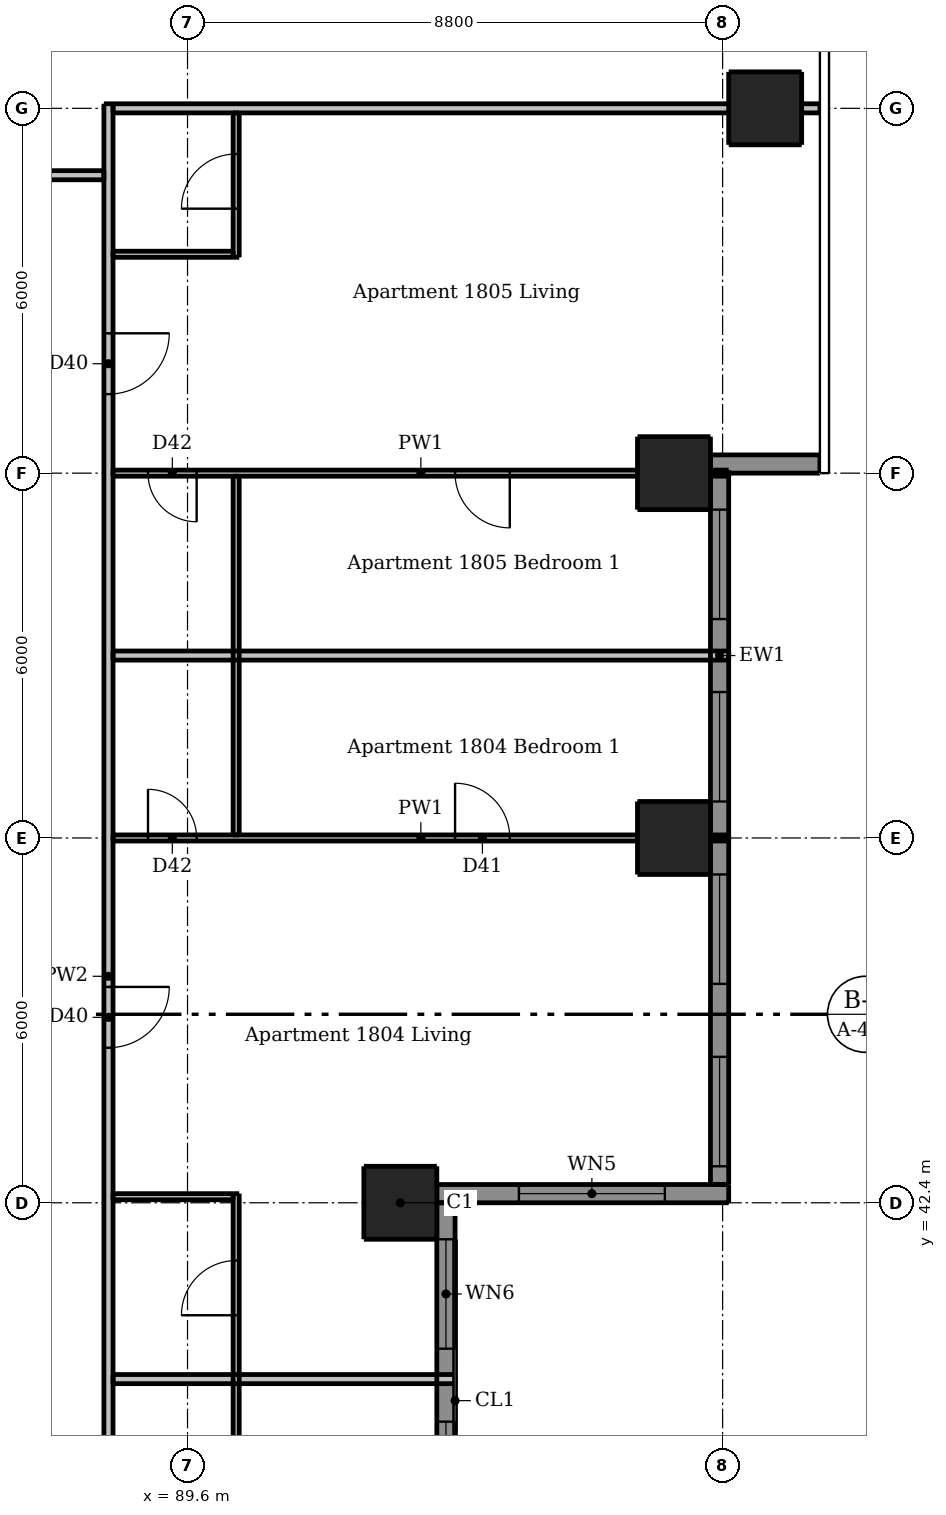
"""IFC4 building model, lengths in metres.
Left out: names, types, materials, properties, quantities, classifications, styles, units other than length and angle.
Written with IfcOpenShell. Run it as: python <this file> out.ifc"""

import sys

from ifc_helpers import new_model, si_unit, direction, frame, frame_2d, origin, origin_2d, place, context, subcontext, project, spatial, rectangle, extrude, element, fill, save


model = new_model("IFC4")
c1 = context("Model", 3, precision=1e-05, world=origin(), true_north=direction((0.0, 1.0)))
c2 = subcontext(c1, "Body", "Model", "MODEL_VIEW")
j1 = project(units=[si_unit("LENGTHUNIT", "METRE"), si_unit("PLANEANGLEUNIT", "RADIAN")], contexts=[c1])
p1 = place(None, origin())
s1 = spatial("IfcSite", under=j1, at=p1, CompositionType="ELEMENT")
p2 = place(p1, origin())
s2 = spatial("IfcBuilding", under=s1, at=p2, CompositionType="ELEMENT")
p3 = place(p2, frame((0.0, 0.0, 66.4)))
s3 = spatial("IfcBuildingStorey", under=s2, at=p3, CompositionType="ELEMENT", Elevation=66.4)
for number, where, z_axis, x_axis in (
    (1, (93.1, 42.4, 0.0), (0.0, 0.0, 1.0), (1.0, 0.0, 0.0)),
    (2, (97.6, 48.4, 0.0), (0.0, 0.0, 1.0), (1.0, 0.0, 0.0)),
    (3, (97.6, 54.4, 0.0), (0.0, 0.0, 1.0), (1.0, 0.0, 0.0)),
    (4, (99.1, 60.4, 0.0), (0.0, 0.0, 1.0), (1.0, 0.0, 0.0)),
):
    element("IfcColumn", number, at=place(p3, frame(where, z_axis=z_axis, x_axis=x_axis)), inside=s3, PredefinedType="COLUMN", context=c2, shape_type="SweptSolid", body=[
        extrude(rectangle(XDim=1.2, YDim=1.2, at=origin_2d()), origin(), (0.0, 0.0, 1.0), 2.95),
    ])
p4 = place(p3, frame((93.7, 42.55, 0.0), z_axis=(0.0, 0.0, 1.0), x_axis=(1.0, 0.0, 0.0)))
e5 = element("IfcWall", 5, at=p4, inside=s3, PredefinedType="SOLIDWALL", context=c2, shape_type="SweptSolid", body=[
    extrude(rectangle(XDim=4.8, YDim=0.3, at=frame_2d((2.4, 0.0))), origin(), (0.0, 0.0, 1.0), 2.95),
])
p5 = place(p4, frame((1.35, 0.0, 0.15)))
e6 = element("IfcOpeningElement", 6, at=p5, cuts=e5, PredefinedType="OPENING", context=c2, shape_type="SweptSolid", body=[
    extrude(rectangle(XDim=2.4, YDim=2.1, at=frame_2d((1.2, 1.05))), frame((0.0, 0.16, 0.0), z_axis=(0.0, -1.0, 0.0), x_axis=(1.0, 0.0, 0.0)), (0.0, 0.0, 1.0), 0.32),
])
p6 = place(p3, frame((98.2, 54.55, 0.0), z_axis=(0.0, 0.0, 1.0), x_axis=(1.0, 0.0, 0.0)))
e7 = element("IfcWall", 7, at=p6, inside=s3, PredefinedType="SOLIDWALL", context=c2, shape_type="SweptSolid", body=[
    extrude(rectangle(XDim=1.8, YDim=0.3, at=frame_2d((0.9, 0.0))), origin(), (0.0, 0.0, 1.0), 2.95),
])
p7 = place(p3, frame((93.85, 36.49, 0.0), z_axis=(0.0, 0.0, 1.0), x_axis=(0.0, 1.0, 0.0)))
e8 = element("IfcWall", 8, at=p7, inside=s3, PredefinedType="SOLIDWALL", context=c2, shape_type="SweptSolid", body=[
    extrude(rectangle(XDim=5.91, YDim=0.3, at=frame_2d((2.955, 0.0))), origin(), (0.0, 0.0, 1.0), 2.95),
])
p8 = place(p7, frame((0.51, 0.0, 0.15)))
e9 = element("IfcOpeningElement", 9, at=p8, cuts=e8, PredefinedType="OPENING", context=c2, shape_type="SweptSolid", body=[
    extrude(rectangle(XDim=1.8, YDim=2.1, at=frame_2d((0.9, 1.05))), frame((0.0, 0.16, 0.0), z_axis=(0.0, -1.0, 0.0), x_axis=(1.0, 0.0, 0.0)), (0.0, 0.0, 1.0), 0.32),
])
p9 = place(p7, frame((3.51, 0.0, 0.15)))
e10 = element("IfcOpeningElement", 10, at=p9, cuts=e8, PredefinedType="OPENING", context=c2, shape_type="SweptSolid", body=[
    extrude(rectangle(XDim=1.8, YDim=2.1, at=frame_2d((0.9, 1.05))), frame((0.0, 0.16, 0.0), z_axis=(0.0, -1.0, 0.0), x_axis=(1.0, 0.0, 0.0)), (0.0, 0.0, 1.0), 0.32),
])
p10 = place(p3, frame((98.35, 42.7, 0.0), z_axis=(0.0, 0.0, 1.0), x_axis=(0.0, 1.0, 0.0)))
e11 = element("IfcWall", 11, at=p10, inside=s3, PredefinedType="SOLIDWALL", context=c2, shape_type="SweptSolid", body=[
    extrude(rectangle(XDim=5.7, YDim=0.3, at=frame_2d((2.85, 0.0))), origin(), (0.0, 0.0, 1.0), 2.341),
])
p11 = place(p10, frame((0.3, 0.0, 0.15)))
e12 = element("IfcOpeningElement", 12, at=p11, cuts=e11, PredefinedType="OPENING", context=c2, shape_type="SweptSolid", body=[
    extrude(rectangle(XDim=1.8, YDim=2.1, at=frame_2d((0.9, 1.05))), frame((0.0, 0.16, 0.0), z_axis=(0.0, -1.0, 0.0), x_axis=(1.0, 0.0, 0.0)), (0.0, 0.0, 1.0), 0.32),
])
p12 = place(p10, frame((3.3, 0.0, 0.15)))
e13 = element("IfcOpeningElement", 13, at=p12, cuts=e11, PredefinedType="OPENING", context=c2, shape_type="SweptSolid", body=[
    extrude(rectangle(XDim=1.8, YDim=2.1, at=frame_2d((0.9, 1.05))), frame((0.0, 0.16, 0.0), z_axis=(0.0, -1.0, 0.0), x_axis=(1.0, 0.0, 0.0)), (0.0, 0.0, 1.0), 0.32),
])
p13 = place(p3, frame((98.35, 48.4, 0.0), z_axis=(0.0, 0.0, 1.0), x_axis=(0.0, 1.0, 0.0)))
e14 = element("IfcWall", 14, at=p13, inside=s3, PredefinedType="SOLIDWALL", context=c2, shape_type="SweptSolid", body=[
    extrude(rectangle(XDim=6.0, YDim=0.3, at=frame_2d((3.0, 0.0))), origin(), (0.0, 0.0, 1.0), 2.341),
])
p14 = place(p13, frame((0.6, 0.0, 0.15)))
e15 = element("IfcOpeningElement", 15, at=p14, cuts=e14, PredefinedType="OPENING", context=c2, shape_type="SweptSolid", body=[
    extrude(rectangle(XDim=1.8, YDim=2.1, at=frame_2d((0.9, 1.05))), frame((0.0, 0.16, 0.0), z_axis=(0.0, -1.0, 0.0), x_axis=(1.0, 0.0, 0.0)), (0.0, 0.0, 1.0), 0.32),
])
p15 = place(p13, frame((3.6, 0.0, 0.15)))
e16 = element("IfcOpeningElement", 16, at=p15, cuts=e14, PredefinedType="OPENING", context=c2, shape_type="SweptSolid", body=[
    extrude(rectangle(XDim=1.8, YDim=2.1, at=frame_2d((0.9, 1.05))), frame((0.0, 0.16, 0.0), z_axis=(0.0, -1.0, 0.0), x_axis=(1.0, 0.0, 0.0)), (0.0, 0.0, 1.0), 0.32),
])
p16 = place(p3, frame((90.4, 33.45, 0.0), z_axis=(0.0, 0.0, 1.0), x_axis=(0.0, 1.0, 0.0)))
e17 = element("IfcWall", 17, at=p16, inside=s3, PredefinedType="PARTITIONING", context=c2, shape_type="SweptSolid", body=[
    extrude(rectangle(XDim=9.1, YDim=0.1, at=frame_2d((4.55, 0.0))), origin(), (0.0, 0.0, 1.0), 2.95),
])
p17 = place(p16, frame((3.8, 0.0, 0.0)))
e18 = element("IfcOpeningElement", 18, at=p17, cuts=e17, PredefinedType="OPENING", context=c2, shape_type="SweptSolid", body=[
    extrude(rectangle(XDim=0.8, YDim=2.1, at=frame_2d((0.4, 1.05))), frame((0.0, 0.06, 0.0), z_axis=(0.0, -1.0, 0.0), x_axis=(1.0, 0.0, 0.0)), (0.0, 0.0, 1.0), 0.12),
])
p18 = place(p16, frame((7.1, 0.0, 0.0)))
e19 = element("IfcOpeningElement", 19, at=p18, cuts=e17, PredefinedType="OPENING", context=c2, shape_type="SweptSolid", body=[
    extrude(rectangle(XDim=0.9, YDim=2.1, at=frame_2d((0.45, 1.05))), frame((0.0, 0.06, 0.0), z_axis=(0.0, -1.0, 0.0), x_axis=(1.0, 0.0, 0.0)), (0.0, 0.0, 1.0), 0.12),
])
p19 = place(p3, frame((90.4, 48.45, 0.0), z_axis=(0.0, 0.0, 1.0), x_axis=(0.0, 1.0, 0.0)))
e20 = element("IfcWall", 20, at=p19, inside=s3, PredefinedType="PARTITIONING", context=c2, shape_type="SweptSolid", body=[
    extrude(rectangle(XDim=5.9, YDim=0.1, at=frame_2d((2.95, 0.0))), origin(), (0.0, 0.0, 1.0), 2.95),
])
p20 = place(p3, frame((90.4, 57.95, 0.0), z_axis=(0.0, 0.0, 1.0), x_axis=(0.0, 1.0, 0.0)))
e21 = element("IfcWall", 21, at=p20, inside=s3, PredefinedType="PARTITIONING", context=c2, shape_type="SweptSolid", body=[
    extrude(rectangle(XDim=2.375, YDim=0.1, at=frame_2d((1.188, 0.0))), origin(), (0.0, 0.0, 1.0), 2.95),
])
p21 = place(p20, frame((0.8, 0.0, 0.0)))
e22 = element("IfcOpeningElement", 22, at=p21, cuts=e21, PredefinedType="OPENING", context=c2, shape_type="SweptSolid", body=[
    extrude(rectangle(XDim=0.9, YDim=2.1, at=frame_2d((0.45, 1.05))), frame((0.0, 0.06, 0.0), z_axis=(0.0, -1.0, 0.0), x_axis=(1.0, 0.0, 0.0)), (0.0, 0.0, 1.0), 0.12),
])
p22 = place(p3, frame((88.375, 58.0, 0.0), z_axis=(0.0, 0.0, 1.0), x_axis=(1.0, 0.0, 0.0)))
e23 = element("IfcWall", 23, at=p22, inside=s3, PredefinedType="PARTITIONING", context=c2, shape_type="SweptSolid", body=[
    extrude(rectangle(XDim=1.975, YDim=0.1, at=frame_2d((0.988, 0.0))), origin(), (0.0, 0.0, 1.0), 2.95),
])
p23 = place(p3, frame((98.5, 54.4, 0.0), z_axis=(0.0, 0.0, 1.0), x_axis=(-1.0, 0.0, 0.0)))
e24 = element("IfcWall", 24, at=p23, inside=s3, PredefinedType="PARTITIONING", context=c2, shape_type="SweptSolid", body=[
    extrude(rectangle(XDim=10.125, YDim=0.1, at=frame_2d((5.062, 0.0))), origin(), (0.0, 0.0, 1.0), 2.332),
])
p24 = place(p23, frame((3.6, 0.0, 0.0)))
e25 = element("IfcOpeningElement", 25, at=p24, cuts=e24, PredefinedType="OPENING", context=c2, shape_type="SweptSolid", body=[
    extrude(rectangle(XDim=0.9, YDim=2.1, at=frame_2d((0.45, 1.05))), frame((0.0, 0.06, 0.0), z_axis=(0.0, -1.0, 0.0), x_axis=(1.0, 0.0, 0.0)), (0.0, 0.0, 1.0), 0.12),
])
p25 = place(p23, frame((8.75, 0.0, 0.0)))
e26 = element("IfcOpeningElement", 26, at=p25, cuts=e24, PredefinedType="OPENING", context=c2, shape_type="SweptSolid", body=[
    extrude(rectangle(XDim=0.8, YDim=2.1, at=frame_2d((0.4, 1.05))), frame((0.0, 0.06, 0.0), z_axis=(0.0, -1.0, 0.0), x_axis=(1.0, 0.0, 0.0)), (0.0, 0.0, 1.0), 0.12),
])
p26 = place(p3, frame((88.375, 48.4, 0.0), z_axis=(0.0, 0.0, 1.0), x_axis=(1.0, 0.0, 0.0)))
e27 = element("IfcWall", 27, at=p26, inside=s3, PredefinedType="PARTITIONING", context=c2, shape_type="SweptSolid", body=[
    extrude(rectangle(XDim=10.125, YDim=0.1, at=frame_2d((5.062, 0.0))), origin(), (0.0, 0.0, 1.0), 2.332),
])
p27 = place(p26, frame((5.625, 0.0, 0.0)))
e28 = element("IfcOpeningElement", 28, at=p27, cuts=e27, PredefinedType="OPENING", context=c2, shape_type="SweptSolid", body=[
    extrude(rectangle(XDim=0.9, YDim=2.1, at=frame_2d((0.45, 1.05))), frame((0.0, 0.06, 0.0), z_axis=(0.0, -1.0, 0.0), x_axis=(1.0, 0.0, 0.0)), (0.0, 0.0, 1.0), 0.12),
])
p28 = place(p26, frame((0.575, 0.0, 0.0)))
e29 = element("IfcOpeningElement", 29, at=p28, cuts=e27, PredefinedType="OPENING", context=c2, shape_type="SweptSolid", body=[
    extrude(rectangle(XDim=0.8, YDim=2.1, at=frame_2d((0.4, 1.05))), frame((0.0, 0.06, 0.0), z_axis=(0.0, -1.0, 0.0), x_axis=(1.0, 0.0, 0.0)), (0.0, 0.0, 1.0), 0.12),
])
p29 = place(p3, frame((88.375, 42.5, 0.0), z_axis=(0.0, 0.0, 1.0), x_axis=(1.0, 0.0, 0.0)))
e30 = element("IfcWall", 30, at=p29, inside=s3, PredefinedType="PARTITIONING", context=c2, shape_type="SweptSolid", body=[
    extrude(rectangle(XDim=1.975, YDim=0.1, at=frame_2d((0.988, 0.0))), origin(), (0.0, 0.0, 1.0), 2.332),
])
p30 = place(p3, frame((88.3, 60.475, 0.0), z_axis=(0.0, 0.0, 1.0), x_axis=(0.0, -1.0, 0.0)))
e31 = element("IfcWall", 31, at=p30, inside=s3, PredefinedType="PARTITIONING", context=c2, shape_type="SweptSolid", body=[
    extrude(rectangle(XDim=28.7, YDim=0.15, at=frame_2d((14.35, 0.0))), origin(), (0.0, 0.0, 1.0), 2.95),
])
p31 = place(p30, frame((27.425, 0.0, 0.0)))
e32 = element("IfcOpeningElement", 32, at=p31, cuts=e31, PredefinedType="OPENING", context=c2, shape_type="SweptSolid", body=[
    extrude(rectangle(XDim=1.0, YDim=2.1, at=frame_2d((0.5, 1.05))), frame((0.0, 0.085, 0.0), z_axis=(0.0, -1.0, 0.0), x_axis=(1.0, 0.0, 0.0)), (0.0, 0.0, 1.0), 0.17),
])
p32 = place(p30, frame((14.525, 0.0, 0.0)))
e33 = element("IfcOpeningElement", 33, at=p32, cuts=e31, PredefinedType="OPENING", context=c2, shape_type="SweptSolid", body=[
    extrude(rectangle(XDim=1.0, YDim=2.1, at=frame_2d((0.5, 1.05))), frame((0.0, 0.085, 0.0), z_axis=(0.0, -1.0, 0.0), x_axis=(1.0, 0.0, 0.0)), (0.0, 0.0, 1.0), 0.17),
])
p33 = place(p30, frame((3.775, 0.0, 0.0)))
e34 = element("IfcOpeningElement", 34, at=p33, cuts=e31, PredefinedType="OPENING", context=c2, shape_type="SweptSolid", body=[
    extrude(rectangle(XDim=1.0, YDim=2.1, at=frame_2d((0.5, 1.05))), frame((0.0, 0.085, 0.0), z_axis=(0.0, -1.0, 0.0), x_axis=(1.0, 0.0, 0.0)), (0.0, 0.0, 1.0), 0.17),
])
p34 = place(p3, frame((88.375, 60.4, 0.0), z_axis=(0.0, 0.0, 1.0), x_axis=(1.0, 0.0, 0.0)))
e35 = element("IfcWall", 35, at=p34, inside=s3, PredefinedType="PARTITIONING", context=c2, shape_type="SweptSolid", body=[
    extrude(rectangle(XDim=11.625, YDim=0.15, at=frame_2d((5.812, 0.0))), origin(), (0.0, 0.0, 1.0), 2.332),
])
p35 = place(p3, frame((59.675, 59.3, 0.0), z_axis=(0.0, 0.0, 1.0), x_axis=(1.0, 0.0, 0.0)))
e36 = element("IfcWall", 36, at=p35, inside=s3, PredefinedType="PARTITIONING", context=c2, shape_type="SweptSolid", body=[
    extrude(rectangle(XDim=28.55, YDim=0.15, at=frame_2d((14.275, 0.0))), origin(), (0.0, 0.0, 1.0), 2.95),
])
p36 = place(p35, frame((3.625, 0.0, 0.0)))
e37 = element("IfcOpeningElement", 37, at=p36, cuts=e36, PredefinedType="OPENING", context=c2, shape_type="SweptSolid", body=[
    extrude(rectangle(XDim=1.0, YDim=2.1, at=frame_2d((0.5, 1.05))), frame((0.0, 0.085, 0.0), z_axis=(0.0, -1.0, 0.0), x_axis=(1.0, 0.0, 0.0)), (0.0, 0.0, 1.0), 0.17),
])
p37 = place(p35, frame((14.425, 0.0, 0.0)))
e38 = element("IfcOpeningElement", 38, at=p37, cuts=e36, PredefinedType="OPENING", context=c2, shape_type="SweptSolid", body=[
    extrude(rectangle(XDim=1.0, YDim=2.1, at=frame_2d((0.5, 1.05))), frame((0.0, 0.085, 0.0), z_axis=(0.0, -1.0, 0.0), x_axis=(1.0, 0.0, 0.0)), (0.0, 0.0, 1.0), 0.17),
])
p38 = place(p35, frame((25.775, 0.0, 0.0)))
e39 = element("IfcOpeningElement", 39, at=p38, cuts=e36, PredefinedType="OPENING", context=c2, shape_type="SweptSolid", body=[
    extrude(rectangle(XDim=1.0, YDim=2.1, at=frame_2d((0.5, 1.05))), frame((0.0, 0.085, 0.0), z_axis=(0.0, -1.0, 0.0), x_axis=(1.0, 0.0, 0.0)), (0.0, 0.0, 1.0), 0.17),
])
p39 = place(p3, frame((88.375, 51.4, 0.0), z_axis=(0.0, 0.0, 1.0), x_axis=(1.0, 0.0, 0.0)))
e40 = element("IfcWall", 40, at=p39, inside=s3, PredefinedType="PARTITIONING", context=c2, shape_type="SweptSolid", body=[
    extrude(rectangle(XDim=10.125, YDim=0.15, at=frame_2d((5.062, 0.0))), origin(), (0.0, 0.0, 1.0), 2.95),
])
p40 = place(p3, frame((88.375, 39.5, 0.0), z_axis=(0.0, 0.0, 1.0), x_axis=(1.0, 0.0, 0.0)))
e41 = element("IfcWall", 41, at=p40, inside=s3, PredefinedType="PARTITIONING", context=c2, shape_type="SweptSolid", body=[
    extrude(rectangle(XDim=5.625, YDim=0.15, at=frame_2d((2.812, 0.0))), origin(), (0.0, 0.0, 1.0), 2.95),
])
p41 = place(p5, origin())
e42 = element("IfcWindow", 42, at=p41, inside=s3, PartitioningType="DOUBLE_PANEL_VERTICAL", PredefinedType="WINDOW", context=c2, shape_type="SweptSolid", body=[
    extrude(rectangle(XDim=2.4, YDim=2.1, at=frame_2d((1.2, 1.05))), frame((0.0, 0.03, 0.0), z_axis=(0.0, -1.0, 0.0), x_axis=(1.0, 0.0, 0.0)), (0.0, 0.0, 1.0), 0.06),
])
fill(e6, e42)
p42 = place(p8, origin())
e43 = element("IfcWindow", 43, at=p42, inside=s3, PartitioningType="DOUBLE_PANEL_VERTICAL", PredefinedType="WINDOW", context=c2, shape_type="SweptSolid", body=[
    extrude(rectangle(XDim=1.8, YDim=2.1, at=frame_2d((0.9, 1.05))), frame((0.0, 0.03, 0.0), z_axis=(0.0, -1.0, 0.0), x_axis=(1.0, 0.0, 0.0)), (0.0, 0.0, 1.0), 0.06),
])
fill(e9, e43)
p43 = place(p9, origin())
e44 = element("IfcWindow", 44, at=p43, inside=s3, PartitioningType="DOUBLE_PANEL_VERTICAL", PredefinedType="WINDOW", context=c2, shape_type="SweptSolid", body=[
    extrude(rectangle(XDim=1.8, YDim=2.1, at=frame_2d((0.9, 1.05))), frame((0.0, 0.03, 0.0), z_axis=(0.0, -1.0, 0.0), x_axis=(1.0, 0.0, 0.0)), (0.0, 0.0, 1.0), 0.06),
])
fill(e10, e44)
p44 = place(p11, origin())
e45 = element("IfcWindow", 45, at=p44, inside=s3, PartitioningType="DOUBLE_PANEL_VERTICAL", PredefinedType="WINDOW", context=c2, shape_type="SweptSolid", body=[
    extrude(rectangle(XDim=1.8, YDim=2.1, at=frame_2d((0.9, 1.05))), frame((0.0, 0.03, 0.0), z_axis=(0.0, -1.0, 0.0), x_axis=(1.0, 0.0, 0.0)), (0.0, 0.0, 1.0), 0.06),
])
fill(e12, e45)
p45 = place(p12, origin())
e46 = element("IfcWindow", 46, at=p45, inside=s3, PartitioningType="DOUBLE_PANEL_VERTICAL", PredefinedType="WINDOW", context=c2, shape_type="SweptSolid", body=[
    extrude(rectangle(XDim=1.8, YDim=2.1, at=frame_2d((0.9, 1.05))), frame((0.0, 0.03, 0.0), z_axis=(0.0, -1.0, 0.0), x_axis=(1.0, 0.0, 0.0)), (0.0, 0.0, 1.0), 0.06),
])
fill(e13, e46)
p46 = place(p14, origin())
e47 = element("IfcWindow", 47, at=p46, inside=s3, PartitioningType="DOUBLE_PANEL_VERTICAL", PredefinedType="WINDOW", context=c2, shape_type="SweptSolid", body=[
    extrude(rectangle(XDim=1.8, YDim=2.1, at=frame_2d((0.9, 1.05))), frame((0.0, 0.03, 0.0), z_axis=(0.0, -1.0, 0.0), x_axis=(1.0, 0.0, 0.0)), (0.0, 0.0, 1.0), 0.06),
])
fill(e15, e47)
p47 = place(p15, origin())
e48 = element("IfcWindow", 48, at=p47, inside=s3, PartitioningType="DOUBLE_PANEL_VERTICAL", PredefinedType="WINDOW", context=c2, shape_type="SweptSolid", body=[
    extrude(rectangle(XDim=1.8, YDim=2.1, at=frame_2d((0.9, 1.05))), frame((0.0, 0.03, 0.0), z_axis=(0.0, -1.0, 0.0), x_axis=(1.0, 0.0, 0.0)), (0.0, 0.0, 1.0), 0.06),
])
fill(e16, e48)
p48 = place(p32, origin())
e49 = element("IfcDoor", 49, at=p48, inside=s3, OperationType="SINGLE_SWING_LEFT", PredefinedType="DOOR", context=c2, shape_type="SweptSolid", body=[
    extrude(rectangle(XDim=1.0, YDim=2.1, at=frame_2d((0.5, 1.05))), frame((0.0, 0.025, 0.0), z_axis=(0.0, -1.0, 0.0), x_axis=(1.0, 0.0, 0.0)), (0.0, 0.0, 1.0), 0.05),
])
fill(e33, e49)
p49 = place(p18, origin())
e50 = element("IfcDoor", 50, at=p49, inside=s3, OperationType="SINGLE_SWING_LEFT", PredefinedType="DOOR", context=c2, shape_type="SweptSolid", body=[
    extrude(rectangle(XDim=0.9, YDim=2.1, at=frame_2d((0.45, 1.05))), frame((0.0, 0.025, 0.0), z_axis=(0.0, -1.0, 0.0), x_axis=(1.0, 0.0, 0.0)), (0.0, 0.0, 1.0), 0.05),
])
fill(e19, e50)
p50 = place(p27, origin())
e51 = element("IfcDoor", 51, at=p50, inside=s3, OperationType="SINGLE_SWING_LEFT", PredefinedType="DOOR", context=c2, shape_type="SweptSolid", body=[
    extrude(rectangle(XDim=0.9, YDim=2.1, at=frame_2d((0.45, 1.05))), frame((0.0, 0.025, 0.0), z_axis=(0.0, -1.0, 0.0), x_axis=(1.0, 0.0, 0.0)), (0.0, 0.0, 1.0), 0.05),
])
fill(e28, e51)
p51 = place(p28, origin())
e52 = element("IfcDoor", 52, at=p51, inside=s3, OperationType="SINGLE_SWING_LEFT", PredefinedType="DOOR", context=c2, shape_type="SweptSolid", body=[
    extrude(rectangle(XDim=0.8, YDim=2.1, at=frame_2d((0.4, 1.05))), frame((0.0, 0.025, 0.0), z_axis=(0.0, -1.0, 0.0), x_axis=(1.0, 0.0, 0.0)), (0.0, 0.0, 1.0), 0.05),
])
fill(e29, e52)
p52 = place(p33, origin())
e53 = element("IfcDoor", 53, at=p52, inside=s3, OperationType="SINGLE_SWING_LEFT", PredefinedType="DOOR", context=c2, shape_type="SweptSolid", body=[
    extrude(rectangle(XDim=1.0, YDim=2.1, at=frame_2d((0.5, 1.05))), frame((0.0, 0.025, 0.0), z_axis=(0.0, -1.0, 0.0), x_axis=(1.0, 0.0, 0.0)), (0.0, 0.0, 1.0), 0.05),
])
fill(e34, e53)
p53 = place(p21, origin())
e54 = element("IfcDoor", 54, at=p53, inside=s3, OperationType="SINGLE_SWING_LEFT", PredefinedType="DOOR", context=c2, shape_type="SweptSolid", body=[
    extrude(rectangle(XDim=0.9, YDim=2.1, at=frame_2d((0.45, 1.05))), frame((0.0, 0.025, 0.0), z_axis=(0.0, -1.0, 0.0), x_axis=(1.0, 0.0, 0.0)), (0.0, 0.0, 1.0), 0.05),
])
fill(e22, e54)
p54 = place(p24, origin())
e55 = element("IfcDoor", 55, at=p54, inside=s3, OperationType="SINGLE_SWING_LEFT", PredefinedType="DOOR", context=c2, shape_type="SweptSolid", body=[
    extrude(rectangle(XDim=0.9, YDim=2.1, at=frame_2d((0.45, 1.05))), frame((0.0, 0.025, 0.0), z_axis=(0.0, -1.0, 0.0), x_axis=(1.0, 0.0, 0.0)), (0.0, 0.0, 1.0), 0.05),
])
fill(e25, e55)
p55 = place(p25, origin())
e56 = element("IfcDoor", 56, at=p55, inside=s3, OperationType="SINGLE_SWING_LEFT", PredefinedType="DOOR", context=c2, shape_type="SweptSolid", body=[
    extrude(rectangle(XDim=0.8, YDim=2.1, at=frame_2d((0.4, 1.05))), frame((0.0, 0.025, 0.0), z_axis=(0.0, -1.0, 0.0), x_axis=(1.0, 0.0, 0.0)), (0.0, 0.0, 1.0), 0.05),
])
fill(e26, e56)
save(model, sys.argv[1])
